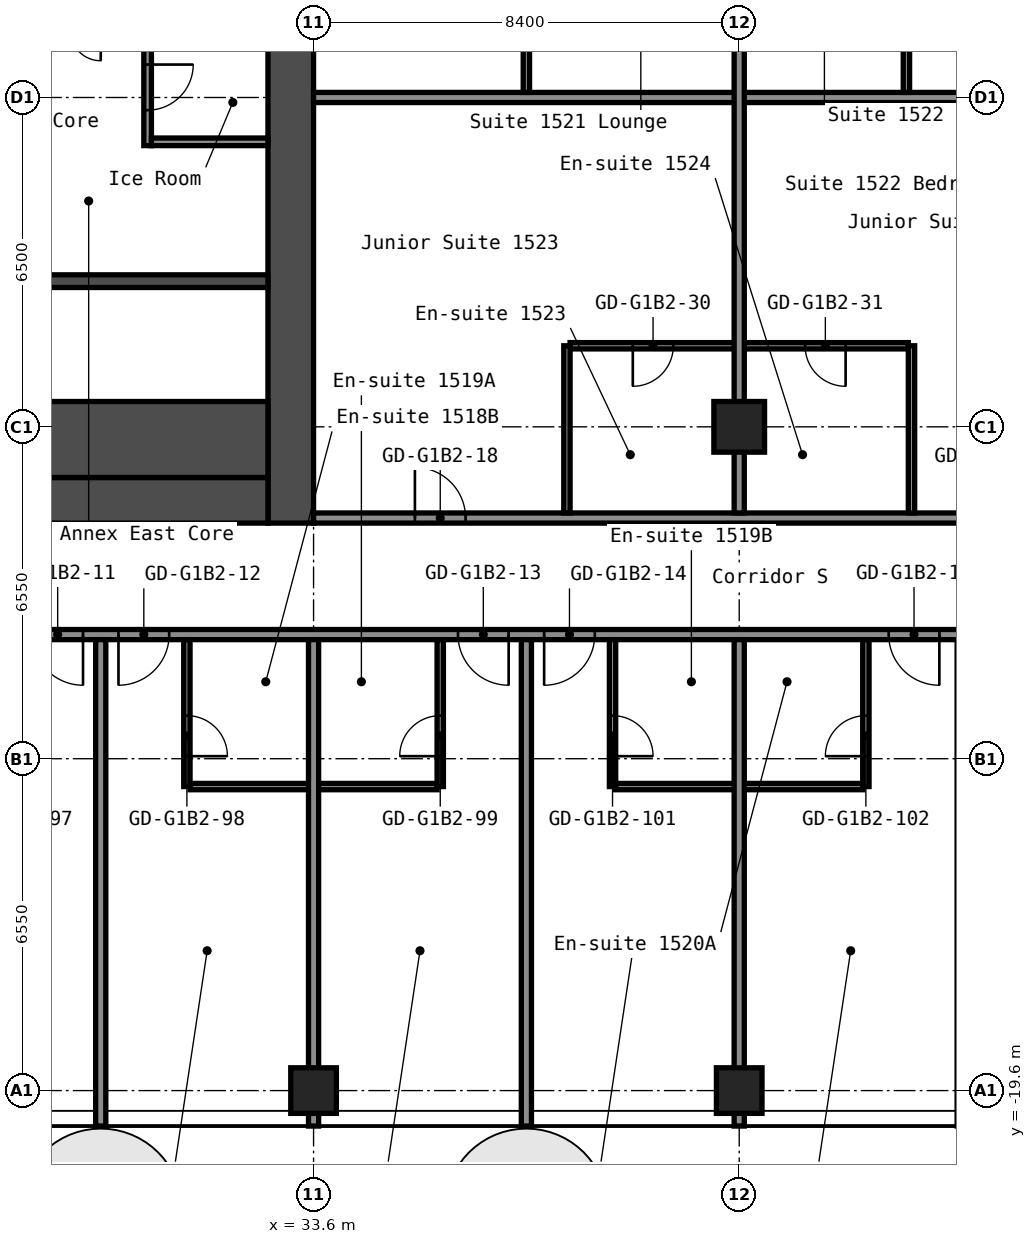
"""IFC4 building model, lengths in metres.
Left out: names, types, materials, properties, quantities, classifications, styles, units other than length and angle.
Written with IfcOpenShell. Run it as: python <this file> out.ifc"""

import sys

from ifc_helpers import new_model, si_unit, direction, frame, frame_2d, origin, origin_2d, place, context, subcontext, project, spatial, rectangle, hollow_rectangle, extrude, element, fill, save


model = new_model("IFC4")
c1 = context("Model", 3, precision=1e-05, world=origin(), true_north=direction((0.0, 1.0)))
c2 = subcontext(c1, "Body", "Model", "MODEL_VIEW")
j1 = project(units=[si_unit("LENGTHUNIT", "METRE"), si_unit("PLANEANGLEUNIT", "RADIAN")], contexts=[c1])
p1 = place(None, origin())
s1 = spatial("IfcSite", under=j1, at=p1, CompositionType="ELEMENT")
p2 = place(p1, origin())
s2 = spatial("IfcBuilding", under=s1, at=p2, CompositionType="ELEMENT")
p3 = place(p2, frame((0.0, 0.0, 55.0)))
s3 = spatial("IfcBuildingStorey", under=s2, at=p3, CompositionType="ELEMENT", Elevation=55.0)
for number, where, z_axis, x_axis in (
    (1, (33.6, -19.6, 0.0), (0.0, 0.0, 1.0), (1.0, 0.0, 0.0)),
    (2, (42.0, -19.6, 0.0), (0.0, 0.0, 1.0), (1.0, 0.0, 0.0)),
):
    element("IfcColumn", number, at=place(p3, frame(where, z_axis=z_axis, x_axis=x_axis)), inside=s3, PredefinedType="COLUMN", context=c2, shape_type="SweptSolid", body=[
        extrude(hollow_rectangle(XDim=0.9, YDim=0.9, WallThickness=0.036, at=origin_2d()), origin(), (0.0, 0.0, 1.0), 2.8),
    ])
p4 = place(p3, frame((42.0, -6.5, 0.0), z_axis=(0.0, 0.0, 1.0), x_axis=(1.0, 0.0, 0.0)))
e3 = element("IfcColumn", 3, at=p4, inside=s3, PredefinedType="COLUMN", context=c2, shape_type="SweptSolid", body=[
    extrude(hollow_rectangle(XDim=1.0, YDim=1.0, WallThickness=0.04, at=origin_2d()), origin(), (0.0, 0.0, 1.0), 2.8),
])
p5 = place(p3, frame((33.15, -8.4, 0.0), z_axis=(0.0, 0.0, 1.0), x_axis=(0.0, 1.0, 0.0)))
e4 = element("IfcWall", 4, at=p5, inside=s3, PredefinedType="SHEAR", context=c2, shape_type="SweptSolid", body=[
    extrude(rectangle(XDim=16.8, YDim=0.9, at=frame_2d((8.4, 0.0))), origin(), (0.0, 0.0, 1.0), 2.8),
])
p6 = place(p3, frame((17.7, -7.95, 0.0), z_axis=(0.0, 0.0, 1.0), x_axis=(1.0, 0.0, 0.0)))
e5 = element("IfcWall", 5, at=p6, inside=s3, PredefinedType="SHEAR", context=c2, shape_type="SweptSolid", body=[
    extrude(rectangle(XDim=15.0, YDim=0.9, at=frame_2d((7.5, 0.0))), origin(), (0.0, 0.0, 1.0), 2.8),
])
p7 = place(p6, frame((2.55, 0.0, 0.0)))
e6 = element("IfcOpeningElement", 6, at=p7, cuts=e5, PredefinedType="OPENING", context=c2, shape_type="SweptSolid", body=[
    extrude(rectangle(XDim=1.0, YDim=2.1, at=frame_2d((0.5, 1.05))), frame((0.0, 0.46, 0.0), z_axis=(0.0, -1.0, 0.0), x_axis=(1.0, 0.0, 0.0)), (0.0, 0.0, 1.0), 0.92),
])
p8 = place(p3, frame((28.15, -3.625, 0.0), z_axis=(0.0, 0.0, 1.0), x_axis=(1.0, 0.0, 0.0)))
e7 = element("IfcWall", 7, at=p8, inside=s3, PredefinedType="SHEAR", context=c2, shape_type="SweptSolid", body=[
    extrude(rectangle(XDim=4.55, YDim=0.25, at=frame_2d((2.275, 0.0))), origin(), (0.0, 0.0, 1.0), 2.8),
])
p9 = place(p3, frame((28.15, -6.75, 0.0), z_axis=(0.0, 0.0, 1.0), x_axis=(1.0, 0.0, 0.0)))
e8 = element("IfcWall", 8, at=p9, inside=s3, PredefinedType="SHEAR", context=c2, shape_type="SweptSolid", body=[
    extrude(rectangle(XDim=4.55, YDim=1.5, at=frame_2d((2.275, 0.0))), origin(), (0.0, 0.0, 1.0), 2.8),
])
p10 = place(p3, frame((30.325, -0.95, 0.0), z_axis=(0.0, 0.0, 1.0), x_axis=(0.0, 1.0, 0.0)))
e9 = element("IfcWall", 9, at=p10, inside=s3, PredefinedType="PARTITIONING", context=c2, shape_type="SweptSolid", body=[
    extrude(rectangle(XDim=2.15, YDim=0.15, at=frame_2d((1.075, 0.0))), origin(), (0.0, 0.0, 1.0), 2.8),
])
p11 = place(p10, frame((0.7, 0.0, 0.0)))
e10 = element("IfcOpeningElement", 10, at=p11, cuts=e9, PredefinedType="OPENING", context=c2, shape_type="SweptSolid", body=[
    extrude(rectangle(XDim=0.9, YDim=2.1, at=frame_2d((0.45, 1.05))), frame((0.0, 0.085, 0.0), z_axis=(0.0, -1.0, 0.0), x_axis=(1.0, 0.0, 0.0)), (0.0, 0.0, 1.0), 0.17),
])
p12 = place(p3, frame((30.4, -0.875, 0.0), z_axis=(0.0, 0.0, 1.0), x_axis=(1.0, 0.0, 0.0)))
e11 = element("IfcWall", 11, at=p12, inside=s3, PredefinedType="PARTITIONING", context=c2, shape_type="SweptSolid", body=[
    extrude(rectangle(XDim=2.3, YDim=0.15, at=frame_2d((1.15, 0.0))), origin(), (0.0, 0.0, 1.0), 2.8),
])
for number, where, z_axis, x_axis in (
    (12, (31.163, -13.6, 0.0), (0.0, 0.0, 1.0), (1.0, 0.0, 0.0)),
    (13, (39.562, -13.6, 0.0), (0.0, 0.0, 1.0), (1.0, 0.0, 0.0)),
):
    element("IfcWall", number, at=place(p3, frame(where, z_axis=z_axis, x_axis=x_axis)), inside=s3, PredefinedType="PARTITIONING", context=c2, shape_type="SweptSolid", body=[
        extrude(rectangle(XDim=4.875, YDim=0.125, at=frame_2d((2.438, 0.0))), origin(), (0.0, 0.0, 1.0), 2.8),
    ])
p13 = place(p3, frame((16.8, -10.6, 0.0), z_axis=(0.0, 0.0, 1.0), x_axis=(1.0, 0.0, 0.0)))
e14 = element("IfcWall", 14, at=p13, inside=s3, PredefinedType="PARTITIONING", context=c2, shape_type="SweptSolid", body=[
    extrude(rectangle(XDim=34.3, YDim=0.2, at=frame_2d((17.15, 0.0))), origin(), (0.0, 0.0, 1.0), 2.8),
])
p14 = place(p13, frame((2.85, 0.0, 0.0)))
e15 = element("IfcOpeningElement", 15, at=p14, cuts=e14, PredefinedType="OPENING", context=c2, shape_type="SweptSolid", body=[
    extrude(rectangle(XDim=1.0, YDim=2.1, at=frame_2d((0.5, 1.05))), frame((0.0, 0.11, 0.0), z_axis=(0.0, -1.0, 0.0), x_axis=(1.0, 0.0, 0.0)), (0.0, 0.0, 1.0), 0.22),
])
p15 = place(p13, frame((4.55, 0.0, 0.0)))
e16 = element("IfcOpeningElement", 16, at=p15, cuts=e14, PredefinedType="OPENING", context=c2, shape_type="SweptSolid", body=[
    extrude(rectangle(XDim=1.0, YDim=2.1, at=frame_2d((0.5, 1.05))), frame((0.0, 0.11, 0.0), z_axis=(0.0, -1.0, 0.0), x_axis=(1.0, 0.0, 0.0)), (0.0, 0.0, 1.0), 0.22),
])
p16 = place(p13, frame((11.25, 0.0, 0.0)))
e17 = element("IfcOpeningElement", 17, at=p16, cuts=e14, PredefinedType="OPENING", context=c2, shape_type="SweptSolid", body=[
    extrude(rectangle(XDim=1.0, YDim=2.1, at=frame_2d((0.5, 1.05))), frame((0.0, 0.11, 0.0), z_axis=(0.0, -1.0, 0.0), x_axis=(1.0, 0.0, 0.0)), (0.0, 0.0, 1.0), 0.22),
])
p17 = place(p13, frame((12.95, 0.0, 0.0)))
e18 = element("IfcOpeningElement", 18, at=p17, cuts=e14, PredefinedType="OPENING", context=c2, shape_type="SweptSolid", body=[
    extrude(rectangle(XDim=1.0, YDim=2.1, at=frame_2d((0.5, 1.05))), frame((0.0, 0.11, 0.0), z_axis=(0.0, -1.0, 0.0), x_axis=(1.0, 0.0, 0.0)), (0.0, 0.0, 1.0), 0.22),
])
p18 = place(p13, frame((19.65, 0.0, 0.0)))
e19 = element("IfcOpeningElement", 19, at=p18, cuts=e14, PredefinedType="OPENING", context=c2, shape_type="SweptSolid", body=[
    extrude(rectangle(XDim=1.0, YDim=2.1, at=frame_2d((0.5, 1.05))), frame((0.0, 0.11, 0.0), z_axis=(0.0, -1.0, 0.0), x_axis=(1.0, 0.0, 0.0)), (0.0, 0.0, 1.0), 0.22),
])
p19 = place(p13, frame((21.35, 0.0, 0.0)))
e20 = element("IfcOpeningElement", 20, at=p19, cuts=e14, PredefinedType="OPENING", context=c2, shape_type="SweptSolid", body=[
    extrude(rectangle(XDim=1.0, YDim=2.1, at=frame_2d((0.5, 1.05))), frame((0.0, 0.11, 0.0), z_axis=(0.0, -1.0, 0.0), x_axis=(1.0, 0.0, 0.0)), (0.0, 0.0, 1.0), 0.22),
])
p20 = place(p13, frame((28.15, 0.0, 0.0)))
e21 = element("IfcOpeningElement", 21, at=p20, cuts=e14, PredefinedType="OPENING", context=c2, shape_type="SweptSolid", body=[
    extrude(rectangle(XDim=1.0, YDim=2.1, at=frame_2d((0.5, 1.05))), frame((0.0, 0.11, 0.0), z_axis=(0.0, -1.0, 0.0), x_axis=(1.0, 0.0, 0.0)), (0.0, 0.0, 1.0), 0.22),
])
p21 = place(p13, frame((30.05, 0.0, 0.0)))
e22 = element("IfcOpeningElement", 22, at=p21, cuts=e14, PredefinedType="OPENING", context=c2, shape_type="SweptSolid", body=[
    extrude(rectangle(XDim=1.0, YDim=2.1, at=frame_2d((0.5, 1.05))), frame((0.0, 0.11, 0.0), z_axis=(0.0, -1.0, 0.0), x_axis=(1.0, 0.0, 0.0)), (0.0, 0.0, 1.0), 0.22),
])
p22 = place(p3, frame((33.6, -8.3, 0.0), z_axis=(0.0, 0.0, 1.0), x_axis=(1.0, 0.0, 0.0)))
e23 = element("IfcWall", 23, at=p22, inside=s3, PredefinedType="PARTITIONING", context=c2, shape_type="SweptSolid", body=[
    extrude(rectangle(XDim=15.0, YDim=0.2, at=frame_2d((7.5, 0.0))), origin(), (0.0, 0.0, 1.0), 2.8),
])
p23 = place(p22, frame((2.0, 0.0, 0.0)))
e24 = element("IfcOpeningElement", 24, at=p23, cuts=e23, PredefinedType="OPENING", context=c2, shape_type="SweptSolid", body=[
    extrude(rectangle(XDim=1.0, YDim=2.1, at=frame_2d((0.5, 1.05))), frame((0.0, 0.11, 0.0), z_axis=(0.0, -1.0, 0.0), x_axis=(1.0, 0.0, 0.0)), (0.0, 0.0, 1.0), 0.22),
])
p24 = place(p22, frame((12.9, 0.0, 0.0)))
e25 = element("IfcOpeningElement", 25, at=p24, cuts=e23, PredefinedType="OPENING", context=c2, shape_type="SweptSolid", body=[
    extrude(rectangle(XDim=1.0, YDim=2.1, at=frame_2d((0.5, 1.05))), frame((0.0, 0.11, 0.0), z_axis=(0.0, -1.0, 0.0), x_axis=(1.0, 0.0, 0.0)), (0.0, 0.0, 1.0), 0.22),
])
p25 = place(p3, frame((38.663, -4.9, 0.0), z_axis=(0.0, 0.0, 1.0), x_axis=(1.0, 0.0, 0.0)))
e26 = element("IfcWall", 26, at=p25, inside=s3, PredefinedType="PARTITIONING", context=c2, shape_type="SweptSolid", body=[
    extrude(rectangle(XDim=6.675, YDim=0.125, at=frame_2d((3.337, 0.0))), origin(), (0.0, 0.0, 1.0), 2.8),
])
p26 = place(p25, frame((1.238, 0.0, 0.0)))
e27 = element("IfcOpeningElement", 27, at=p26, cuts=e26, PredefinedType="OPENING", context=c2, shape_type="SweptSolid", body=[
    extrude(rectangle(XDim=0.8, YDim=2.1, at=frame_2d((0.4, 1.05))), frame((0.0, 0.073, 0.0), z_axis=(0.0, -1.0, 0.0), x_axis=(1.0, 0.0, 0.0)), (0.0, 0.0, 1.0), 0.145),
])
p27 = place(p25, frame((4.637, 0.0, 0.0)))
e28 = element("IfcOpeningElement", 28, at=p27, cuts=e26, PredefinedType="OPENING", context=c2, shape_type="SweptSolid", body=[
    extrude(rectangle(XDim=0.8, YDim=2.1, at=frame_2d((0.4, 1.05))), frame((0.0, 0.073, 0.0), z_axis=(0.0, -1.0, 0.0), x_axis=(1.0, 0.0, 0.0)), (0.0, 0.0, 1.0), 0.145),
])
p28 = place(p3, frame((33.6, 0.0, 0.0), z_axis=(0.0, 0.0, 1.0), x_axis=(1.0, 0.0, 0.0)))
e29 = element("IfcWall", 29, at=p28, inside=s3, PredefinedType="PARTITIONING", context=c2, shape_type="SweptSolid", body=[
    extrude(rectangle(XDim=14.9, YDim=0.2, at=frame_2d((7.45, 0.0))), origin(), (0.0, 0.0, 1.0), 2.8),
])
p29 = place(p3, frame((29.4, -20.3, 0.0), z_axis=(0.0, 0.0, 1.0), x_axis=(0.0, 1.0, 0.0)))
e30 = element("IfcWall", 30, at=p29, inside=s3, PredefinedType="PARTITIONING", context=c2, shape_type="SweptSolid", body=[
    extrude(rectangle(XDim=9.6, YDim=0.2, at=frame_2d((4.8, 0.0))), origin(), (0.0, 0.0, 1.0), 2.8),
])
p30 = place(p3, frame((31.1, -13.6, 0.0), z_axis=(0.0, 0.0, 1.0), x_axis=(0.0, 1.0, 0.0)))
e31 = element("IfcWall", 31, at=p30, inside=s3, PredefinedType="PARTITIONING", context=c2, shape_type="SweptSolid", body=[
    extrude(rectangle(XDim=2.9, YDim=0.125, at=frame_2d((1.45, 0.0))), origin(), (0.0, 0.0, 1.0), 2.8),
])
p31 = place(p30, frame((0.6, 0.0, 0.0)))
e32 = element("IfcOpeningElement", 32, at=p31, cuts=e31, PredefinedType="OPENING", context=c2, shape_type="SweptSolid", body=[
    extrude(rectangle(XDim=0.8, YDim=2.1, at=frame_2d((0.4, 1.05))), frame((0.0, 0.073, 0.0), z_axis=(0.0, -1.0, 0.0), x_axis=(1.0, 0.0, 0.0)), (0.0, 0.0, 1.0), 0.145),
])
p32 = place(p3, frame((33.6, -20.3, 0.0), z_axis=(0.0, 0.0, 1.0), x_axis=(0.0, 1.0, 0.0)))
e33 = element("IfcWall", 33, at=p32, inside=s3, PredefinedType="PARTITIONING", context=c2, shape_type="SweptSolid", body=[
    extrude(rectangle(XDim=9.6, YDim=0.2, at=frame_2d((4.8, 0.0))), origin(), (0.0, 0.0, 1.0), 2.8),
])
p33 = place(p3, frame((36.1, -13.6, 0.0), z_axis=(0.0, 0.0, 1.0), x_axis=(0.0, 1.0, 0.0)))
e34 = element("IfcWall", 34, at=p33, inside=s3, PredefinedType="PARTITIONING", context=c2, shape_type="SweptSolid", body=[
    extrude(rectangle(XDim=2.9, YDim=0.125, at=frame_2d((1.45, 0.0))), origin(), (0.0, 0.0, 1.0), 2.8),
])
p34 = place(p33, frame((0.6, 0.0, 0.0)))
e35 = element("IfcOpeningElement", 35, at=p34, cuts=e34, PredefinedType="OPENING", context=c2, shape_type="SweptSolid", body=[
    extrude(rectangle(XDim=0.8, YDim=2.1, at=frame_2d((0.4, 1.05))), frame((0.0, 0.073, 0.0), z_axis=(0.0, -1.0, 0.0), x_axis=(1.0, 0.0, 0.0)), (0.0, 0.0, 1.0), 0.145),
])
p35 = place(p3, frame((37.8, -20.3, 0.0), z_axis=(0.0, 0.0, 1.0), x_axis=(0.0, 1.0, 0.0)))
e36 = element("IfcWall", 36, at=p35, inside=s3, PredefinedType="PARTITIONING", context=c2, shape_type="SweptSolid", body=[
    extrude(rectangle(XDim=9.6, YDim=0.2, at=frame_2d((4.8, 0.0))), origin(), (0.0, 0.0, 1.0), 2.8),
])
p36 = place(p3, frame((37.8, 0.1, 0.0), z_axis=(0.0, 0.0, 1.0), x_axis=(0.0, 1.0, 0.0)))
e37 = element("IfcWall", 37, at=p36, inside=s3, PredefinedType="PARTITIONING", context=c2, shape_type="SweptSolid", body=[
    extrude(rectangle(XDim=8.1, YDim=0.125, at=frame_2d((4.05, 0.0))), origin(), (0.0, 0.0, 1.0), 2.8),
])
p37 = place(p36, frame((3.15, 0.0, 0.0)))
e38 = element("IfcOpeningElement", 38, at=p37, cuts=e37, PredefinedType="OPENING", context=c2, shape_type="SweptSolid", body=[
    extrude(rectangle(XDim=0.9, YDim=2.1, at=frame_2d((0.45, 1.05))), frame((0.0, 0.073, 0.0), z_axis=(0.0, -1.0, 0.0), x_axis=(1.0, 0.0, 0.0)), (0.0, 0.0, 1.0), 0.145),
])
p38 = place(p3, frame((38.6, -8.2, 0.0), z_axis=(0.0, 0.0, 1.0), x_axis=(0.0, 1.0, 0.0)))
e39 = element("IfcWall", 39, at=p38, inside=s3, PredefinedType="PARTITIONING", context=c2, shape_type="SweptSolid", body=[
    extrude(rectangle(XDim=3.3, YDim=0.125, at=frame_2d((1.65, 0.0))), origin(), (0.0, 0.0, 1.0), 2.8),
])
p39 = place(p3, frame((39.5, -13.6, 0.0), z_axis=(0.0, 0.0, 1.0), x_axis=(0.0, 1.0, 0.0)))
e40 = element("IfcWall", 40, at=p39, inside=s3, PredefinedType="PARTITIONING", context=c2, shape_type="SweptSolid", body=[
    extrude(rectangle(XDim=2.9, YDim=0.125, at=frame_2d((1.45, 0.0))), origin(), (0.0, 0.0, 1.0), 2.8),
])
p40 = place(p39, frame((0.6, 0.0, 0.0)))
e41 = element("IfcOpeningElement", 41, at=p40, cuts=e40, PredefinedType="OPENING", context=c2, shape_type="SweptSolid", body=[
    extrude(rectangle(XDim=0.8, YDim=2.1, at=frame_2d((0.4, 1.05))), frame((0.0, 0.073, 0.0), z_axis=(0.0, -1.0, 0.0), x_axis=(1.0, 0.0, 0.0)), (0.0, 0.0, 1.0), 0.145),
])
p41 = place(p3, frame((42.0, -20.3, 0.0), z_axis=(0.0, 0.0, 1.0), x_axis=(0.0, 1.0, 0.0)))
e42 = element("IfcWall", 42, at=p41, inside=s3, PredefinedType="PARTITIONING", context=c2, shape_type="SweptSolid", body=[
    extrude(rectangle(XDim=9.6, YDim=0.2, at=frame_2d((4.8, 0.0))), origin(), (0.0, 0.0, 1.0), 2.8),
])
p42 = place(p3, frame((42.0, -8.2, 0.0), z_axis=(0.0, 0.0, 1.0), x_axis=(0.0, 1.0, 0.0)))
e43 = element("IfcWall", 43, at=p42, inside=s3, PredefinedType="PARTITIONING", context=c2, shape_type="SweptSolid", body=[
    extrude(rectangle(XDim=16.4, YDim=0.2, at=frame_2d((8.2, 0.0))), origin(), (0.0, 0.0, 1.0), 2.8),
])
p43 = place(p3, frame((44.5, -13.6, 0.0), z_axis=(0.0, 0.0, 1.0), x_axis=(0.0, 1.0, 0.0)))
e44 = element("IfcWall", 44, at=p43, inside=s3, PredefinedType="PARTITIONING", context=c2, shape_type="SweptSolid", body=[
    extrude(rectangle(XDim=2.9, YDim=0.125, at=frame_2d((1.45, 0.0))), origin(), (0.0, 0.0, 1.0), 2.8),
])
p44 = place(p43, frame((0.6, 0.0, 0.0)))
e45 = element("IfcOpeningElement", 45, at=p44, cuts=e44, PredefinedType="OPENING", context=c2, shape_type="SweptSolid", body=[
    extrude(rectangle(XDim=0.8, YDim=2.1, at=frame_2d((0.4, 1.05))), frame((0.0, 0.073, 0.0), z_axis=(0.0, -1.0, 0.0), x_axis=(1.0, 0.0, 0.0)), (0.0, 0.0, 1.0), 0.145),
])
p45 = place(p3, frame((45.3, 0.1, 0.0), z_axis=(0.0, 0.0, 1.0), x_axis=(0.0, 1.0, 0.0)))
e46 = element("IfcWall", 46, at=p45, inside=s3, PredefinedType="PARTITIONING", context=c2, shape_type="SweptSolid", body=[
    extrude(rectangle(XDim=8.1, YDim=0.125, at=frame_2d((4.05, 0.0))), origin(), (0.0, 0.0, 1.0), 2.8),
])
p46 = place(p45, frame((3.15, 0.0, 0.0)))
e47 = element("IfcOpeningElement", 47, at=p46, cuts=e46, PredefinedType="OPENING", context=c2, shape_type="SweptSolid", body=[
    extrude(rectangle(XDim=0.9, YDim=2.1, at=frame_2d((0.45, 1.05))), frame((0.0, 0.073, 0.0), z_axis=(0.0, -1.0, 0.0), x_axis=(1.0, 0.0, 0.0)), (0.0, 0.0, 1.0), 0.145),
])
p47 = place(p3, frame((45.4, -8.2, 0.0), z_axis=(0.0, 0.0, 1.0), x_axis=(0.0, 1.0, 0.0)))
e48 = element("IfcWall", 48, at=p47, inside=s3, PredefinedType="PARTITIONING", context=c2, shape_type="SweptSolid", body=[
    extrude(rectangle(XDim=3.3, YDim=0.125, at=frame_2d((1.65, 0.0))), origin(), (0.0, 0.0, 1.0), 2.8),
])
p48 = place(p11, origin())
e49 = element("IfcDoor", 49, at=p48, inside=s3, OperationType="SINGLE_SWING_RIGHT", PredefinedType="DOOR", context=c2, shape_type="SweptSolid", body=[
    extrude(rectangle(XDim=0.9, YDim=2.1, at=frame_2d((0.45, 1.05))), frame((0.0, 0.025, 0.0), z_axis=(0.0, -1.0, 0.0), x_axis=(1.0, 0.0, 0.0)), (0.0, 0.0, 1.0), 0.05),
])
fill(e10, e49)
p49 = place(p16, origin())
e50 = element("IfcDoor", 50, at=p49, inside=s3, OperationType="SINGLE_SWING_RIGHT", PredefinedType="DOOR", context=c2, shape_type="SweptSolid", body=[
    extrude(rectangle(XDim=1.0, YDim=2.1, at=frame_2d((0.5, 1.05))), frame((0.0, 0.025, 0.0), z_axis=(0.0, -1.0, 0.0), x_axis=(1.0, 0.0, 0.0)), (0.0, 0.0, 1.0), 0.05),
])
fill(e17, e50)
p50 = place(p17, origin())
e51 = element("IfcDoor", 51, at=p50, inside=s3, OperationType="SINGLE_SWING_LEFT", PredefinedType="DOOR", context=c2, shape_type="SweptSolid", body=[
    extrude(rectangle(XDim=1.0, YDim=2.1, at=frame_2d((0.5, 1.05))), frame((0.0, 0.025, 0.0), z_axis=(0.0, -1.0, 0.0), x_axis=(1.0, 0.0, 0.0)), (0.0, 0.0, 1.0), 0.05),
])
fill(e18, e51)
p51 = place(p18, origin())
e52 = element("IfcDoor", 52, at=p51, inside=s3, OperationType="SINGLE_SWING_RIGHT", PredefinedType="DOOR", context=c2, shape_type="SweptSolid", body=[
    extrude(rectangle(XDim=1.0, YDim=2.1, at=frame_2d((0.5, 1.05))), frame((0.0, 0.025, 0.0), z_axis=(0.0, -1.0, 0.0), x_axis=(1.0, 0.0, 0.0)), (0.0, 0.0, 1.0), 0.05),
])
fill(e19, e52)
p52 = place(p19, origin())
e53 = element("IfcDoor", 53, at=p52, inside=s3, OperationType="SINGLE_SWING_LEFT", PredefinedType="DOOR", context=c2, shape_type="SweptSolid", body=[
    extrude(rectangle(XDim=1.0, YDim=2.1, at=frame_2d((0.5, 1.05))), frame((0.0, 0.025, 0.0), z_axis=(0.0, -1.0, 0.0), x_axis=(1.0, 0.0, 0.0)), (0.0, 0.0, 1.0), 0.05),
])
fill(e20, e53)
p53 = place(p20, origin())
e54 = element("IfcDoor", 54, at=p53, inside=s3, OperationType="SINGLE_SWING_RIGHT", PredefinedType="DOOR", context=c2, shape_type="SweptSolid", body=[
    extrude(rectangle(XDim=1.0, YDim=2.1, at=frame_2d((0.5, 1.05))), frame((0.0, 0.025, 0.0), z_axis=(0.0, -1.0, 0.0), x_axis=(1.0, 0.0, 0.0)), (0.0, 0.0, 1.0), 0.05),
])
fill(e21, e54)
p54 = place(p23, origin())
e55 = element("IfcDoor", 55, at=p54, inside=s3, OperationType="SINGLE_SWING_RIGHT", PredefinedType="DOOR", context=c2, shape_type="SweptSolid", body=[
    extrude(rectangle(XDim=1.0, YDim=2.1, at=frame_2d((0.5, 1.05))), frame((0.0, 0.025, 0.0), z_axis=(0.0, -1.0, 0.0), x_axis=(1.0, 0.0, 0.0)), (0.0, 0.0, 1.0), 0.05),
])
fill(e24, e55)
p55 = place(p26, origin())
e56 = element("IfcDoor", 56, at=p55, inside=s3, OperationType="SINGLE_SWING_LEFT", PredefinedType="DOOR", context=c2, shape_type="SweptSolid", body=[
    extrude(rectangle(XDim=0.8, YDim=2.1, at=frame_2d((0.4, 1.05))), frame((0.0, 0.025, 0.0), z_axis=(0.0, -1.0, 0.0), x_axis=(1.0, 0.0, 0.0)), (0.0, 0.0, 1.0), 0.05),
])
fill(e27, e56)
p56 = place(p27, origin())
e57 = element("IfcDoor", 57, at=p56, inside=s3, OperationType="SINGLE_SWING_RIGHT", PredefinedType="DOOR", context=c2, shape_type="SweptSolid", body=[
    extrude(rectangle(XDim=0.8, YDim=2.1, at=frame_2d((0.4, 1.05))), frame((0.0, 0.025, 0.0), z_axis=(0.0, -1.0, 0.0), x_axis=(1.0, 0.0, 0.0)), (0.0, 0.0, 1.0), 0.05),
])
fill(e28, e57)
p57 = place(p31, origin())
e58 = element("IfcDoor", 58, at=p57, inside=s3, OperationType="SINGLE_SWING_LEFT", PredefinedType="DOOR", context=c2, shape_type="SweptSolid", body=[
    extrude(rectangle(XDim=0.8, YDim=2.1, at=frame_2d((0.4, 1.05))), frame((0.0, 0.025, 0.0), z_axis=(0.0, -1.0, 0.0), x_axis=(1.0, 0.0, 0.0)), (0.0, 0.0, 1.0), 0.05),
])
fill(e32, e58)
p58 = place(p34, origin())
e59 = element("IfcDoor", 59, at=p58, inside=s3, OperationType="SINGLE_SWING_RIGHT", PredefinedType="DOOR", context=c2, shape_type="SweptSolid", body=[
    extrude(rectangle(XDim=0.8, YDim=2.1, at=frame_2d((0.4, 1.05))), frame((0.0, 0.025, 0.0), z_axis=(0.0, -1.0, 0.0), x_axis=(1.0, 0.0, 0.0)), (0.0, 0.0, 1.0), 0.05),
])
fill(e35, e59)
p59 = place(p40, origin())
e60 = element("IfcDoor", 60, at=p59, inside=s3, OperationType="SINGLE_SWING_LEFT", PredefinedType="DOOR", context=c2, shape_type="SweptSolid", body=[
    extrude(rectangle(XDim=0.8, YDim=2.1, at=frame_2d((0.4, 1.05))), frame((0.0, 0.025, 0.0), z_axis=(0.0, -1.0, 0.0), x_axis=(1.0, 0.0, 0.0)), (0.0, 0.0, 1.0), 0.05),
])
fill(e41, e60)
p60 = place(p44, origin())
e61 = element("IfcDoor", 61, at=p60, inside=s3, OperationType="SINGLE_SWING_RIGHT", PredefinedType="DOOR", context=c2, shape_type="SweptSolid", body=[
    extrude(rectangle(XDim=0.8, YDim=2.1, at=frame_2d((0.4, 1.05))), frame((0.0, 0.025, 0.0), z_axis=(0.0, -1.0, 0.0), x_axis=(1.0, 0.0, 0.0)), (0.0, 0.0, 1.0), 0.05),
])
fill(e45, e61)
save(model, sys.argv[1])
